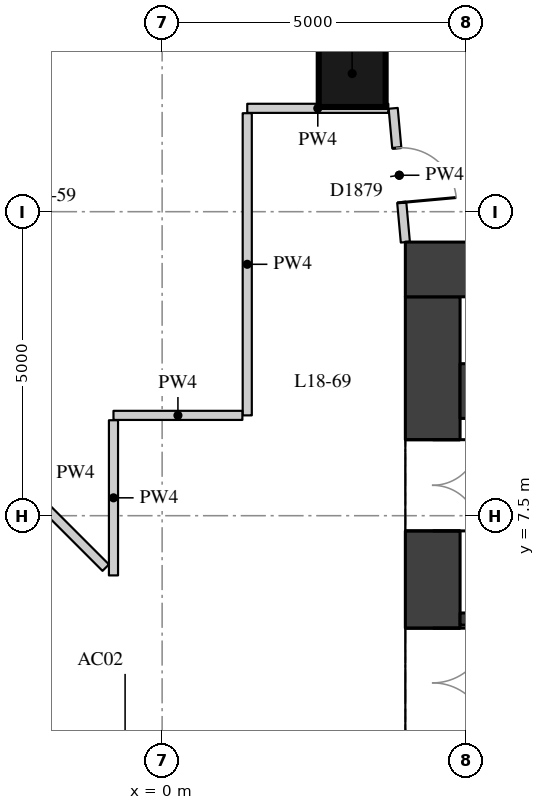
"""IFC4 building model, lengths in metres.
Left out: names, types, materials, properties, quantities, classifications, styles, units other than length and angle.
Written with IfcOpenShell. Run it as: python <this file> out.ifc"""

import sys

from ifc_helpers import new_model, si_unit, direction, frame, frame_2d, origin, origin_2d, place, context, subcontext, project, spatial, rectangle, extrude, element, fill, save


model = new_model("IFC4")
c1 = context("Model", 3, precision=1e-05, world=origin(), true_north=direction((0.0, 1.0)))
c2 = subcontext(c1, "Body", "Model", "MODEL_VIEW")
j1 = project(units=[si_unit("LENGTHUNIT", "METRE"), si_unit("PLANEANGLEUNIT", "RADIAN")], contexts=[c1])
p1 = place(None, origin())
s1 = spatial("IfcSite", under=j1, at=p1, CompositionType="ELEMENT")
p2 = place(p1, origin())
s2 = spatial("IfcBuilding", under=s1, at=p2, CompositionType="ELEMENT")
p3 = place(p2, frame((0.0, 0.0, 67.9)))
s3 = spatial("IfcBuildingStorey", under=s2, at=p3, CompositionType="ELEMENT", Elevation=67.9)
p4 = place(p3, frame((3.126, 14.772, 0.0), z_axis=(0.0, 0.0, 1.0), x_axis=(1.0, 0.0, 0.0)))
e1 = element("IfcColumn", 1, at=p4, inside=s3, PredefinedType="COLUMN", context=c2, shape_type="SweptSolid", body=[
    extrude(rectangle(XDim=1.1, YDim=1.1, at=origin_2d()), origin(), (0.0, 0.0, 1.0), 3.3),
])
p5 = place(p3, frame((4.45, -11.1, 0.0), z_axis=(0.0, 0.0, 1.0), x_axis=(0.0, 1.0, 0.0)))
e2 = element("IfcWall", 2, at=p5, inside=s3, PredefinedType="SHEAR", context=c2, shape_type="SweptSolid", body=[
    extrude(rectangle(XDim=22.2, YDim=0.9, at=frame_2d((11.1, 0.0))), origin(), (0.0, 0.0, 1.0), 3.02),
])
p6 = place(p5, frame((2.35, 0.0, 0.0)))
e3 = element("IfcOpeningElement", 3, at=p6, cuts=e2, PredefinedType="OPENING", context=c2, shape_type="SweptSolid", body=[
    extrude(rectangle(XDim=1.5, YDim=2.1, at=frame_2d((0.75, 1.05))), frame((0.0, 0.46, 0.0), z_axis=(0.0, -1.0, 0.0), x_axis=(1.0, 0.0, 0.0)), (0.0, 0.0, 1.0), 0.92),
])
p7 = place(p5, frame((5.45, 0.0, 0.0)))
e4 = element("IfcOpeningElement", 4, at=p7, cuts=e2, PredefinedType="OPENING", context=c2, shape_type="SweptSolid", body=[
    extrude(rectangle(XDim=1.8, YDim=2.1, at=frame_2d((0.9, 1.05))), frame((0.0, 0.46, 0.0), z_axis=(0.0, -1.0, 0.0), x_axis=(1.0, 0.0, 0.0)), (0.0, 0.0, 1.0), 0.92),
])
p8 = place(p5, frame((7.95, 0.0, 0.0)))
e5 = element("IfcOpeningElement", 5, at=p8, cuts=e2, PredefinedType="OPENING", context=c2, shape_type="SweptSolid", body=[
    extrude(rectangle(XDim=1.1, YDim=2.1, at=frame_2d((0.55, 1.05))), frame((0.0, 0.46, 0.0), z_axis=(0.0, -1.0, 0.0), x_axis=(1.0, 0.0, 0.0)), (0.0, 0.0, 1.0), 0.92),
])
p9 = place(p5, frame((10.6, 0.0, 0.0)))
e6 = element("IfcOpeningElement", 6, at=p9, cuts=e2, PredefinedType="OPENING", context=c2, shape_type="SweptSolid", body=[
    extrude(rectangle(XDim=1.0, YDim=2.1, at=frame_2d((0.5, 1.05))), frame((0.0, 0.46, 0.0), z_axis=(0.0, -1.0, 0.0), x_axis=(1.0, 0.0, 0.0)), (0.0, 0.0, 1.0), 0.92),
])
p10 = place(p5, frame((13.15, 0.0, 0.0)))
e7 = element("IfcOpeningElement", 7, at=p10, cuts=e2, PredefinedType="OPENING", context=c2, shape_type="SweptSolid", body=[
    extrude(rectangle(XDim=1.1, YDim=2.1, at=frame_2d((0.55, 1.05))), frame((0.0, 0.46, 0.0), z_axis=(0.0, -1.0, 0.0), x_axis=(1.0, 0.0, 0.0)), (0.0, 0.0, 1.0), 0.92),
])
p11 = place(p5, frame((14.95, 0.0, 0.0)))
e8 = element("IfcOpeningElement", 8, at=p11, cuts=e2, PredefinedType="OPENING", context=c2, shape_type="SweptSolid", body=[
    extrude(rectangle(XDim=1.8, YDim=2.1, at=frame_2d((0.9, 1.05))), frame((0.0, 0.46, 0.0), z_axis=(0.0, -1.0, 0.0), x_axis=(1.0, 0.0, 0.0)), (0.0, 0.0, 1.0), 0.92),
])
p12 = place(p5, frame((18.35, 0.0, 0.0)))
e9 = element("IfcOpeningElement", 9, at=p12, cuts=e2, PredefinedType="OPENING", context=c2, shape_type="SweptSolid", body=[
    extrude(rectangle(XDim=1.5, YDim=2.1, at=frame_2d((0.75, 1.05))), frame((0.0, 0.46, 0.0), z_axis=(0.0, -1.0, 0.0), x_axis=(1.0, 0.0, 0.0)), (0.0, 0.0, 1.0), 0.92),
])
p13 = place(p3, frame((4.0, 11.55, 0.0), z_axis=(0.0, 0.0, 1.0), x_axis=(1.0, 0.0, 0.0)))
e10 = element("IfcWall", 10, at=p13, inside=s3, PredefinedType="SHEAR", context=c2, shape_type="SweptSolid", body=[
    extrude(rectangle(XDim=15.2, YDim=0.9, at=frame_2d((7.6, 0.0))), origin(), (0.0, 0.0, 1.0), 3.02),
])
p14 = place(p3, frame((4.9, 9.55, 0.0), z_axis=(0.0, 0.0, 1.0), x_axis=(1.0, 0.0, 0.0)))
e11 = element("IfcWall", 11, at=p14, inside=s3, PredefinedType="SHEAR", context=c2, shape_type="SweptSolid", body=[
    extrude(rectangle(XDim=10.2, YDim=0.9, at=frame_2d((5.1, 0.0))), origin(), (0.0, 0.0, 1.0), 3.02),
])
p15 = place(p3, frame((4.9, 5.8, 0.0), z_axis=(0.0, 0.0, 1.0), x_axis=(1.0, 0.0, 0.0)))
e12 = element("IfcWall", 12, at=p15, inside=s3, PredefinedType="SHEAR", context=c2, shape_type="SweptSolid", body=[
    extrude(rectangle(XDim=10.2, YDim=0.2, at=frame_2d((5.1, 0.0))), origin(), (0.0, 0.0, 1.0), 3.02),
])
p16 = place(p15, frame((6.75, 0.0, 0.0)))
e13 = element("IfcOpeningElement", 13, at=p16, cuts=e12, PredefinedType="OPENING", context=c2, shape_type="SweptSolid", body=[
    extrude(rectangle(XDim=1.1, YDim=2.1, at=frame_2d((0.55, 1.05))), frame((0.0, 0.11, 0.0), z_axis=(0.0, -1.0, 0.0), x_axis=(1.0, 0.0, 0.0)), (0.0, 0.0, 1.0), 0.22),
])
p17 = place(p15, frame((8.75, 0.0, 0.0)))
e14 = element("IfcOpeningElement", 14, at=p17, cuts=e12, PredefinedType="OPENING", context=c2, shape_type="SweptSolid", body=[
    extrude(rectangle(XDim=1.1, YDim=2.1, at=frame_2d((0.55, 1.05))), frame((0.0, 0.11, 0.0), z_axis=(0.0, -1.0, 0.0), x_axis=(1.0, 0.0, 0.0)), (0.0, 0.0, 1.0), 0.22),
])
p18 = place(p3, frame((4.0, 11.999, 0.0), z_axis=(0.0, 0.0, 1.0), x_axis=(-0.090475982725, 0.995898637689, 0.0)))
e15 = element("IfcWall", 15, at=p18, inside=s3, PredefinedType="PARTITIONING", context=c2, shape_type="SweptSolid", body=[
    extrude(rectangle(XDim=2.21, YDim=0.15, at=frame_2d((1.105, 0.0))), origin(), (0.0, 0.0, 1.0), 3.02),
])
p19 = place(p18, frame((0.655, 0.0, 0.0)))
e16 = element("IfcOpeningElement", 16, at=p19, cuts=e15, PredefinedType="OPENING", context=c2, shape_type="SweptSolid", body=[
    extrude(rectangle(XDim=0.9, YDim=2.1, at=frame_2d((0.45, 1.05))), frame((0.0, 0.085, 0.0), z_axis=(0.0, -1.0, 0.0), x_axis=(1.0, 0.0, 0.0)), (0.0, 0.0, 1.0), 0.17),
])
p20 = place(p3, frame((3.72, 14.2, 0.0), z_axis=(0.0, 0.0, 1.0), x_axis=(-1.0, 0.0, 0.0)))
e17 = element("IfcWall", 17, at=p20, inside=s3, PredefinedType="PARTITIONING", context=c2, shape_type="SweptSolid", body=[
    extrude(rectangle(XDim=2.32, YDim=0.15, at=frame_2d((1.16, 0.0))), origin(), (0.0, 0.0, 1.0), 3.02),
])
p21 = place(p3, frame((1.4, 14.12, 0.0), z_axis=(0.0, 0.0, 1.0), x_axis=(0.0, -1.0, 0.0)))
e18 = element("IfcWall", 18, at=p21, inside=s3, PredefinedType="PARTITIONING", context=c2, shape_type="SweptSolid", body=[
    extrude(rectangle(XDim=4.97, YDim=0.15, at=frame_2d((2.485, 0.0))), origin(), (0.0, 0.0, 1.0), 3.02),
])
p22 = place(p3, frame((1.32, 9.15, 0.0), z_axis=(0.0, 0.0, 1.0), x_axis=(-1.0, 0.0, 0.0)))
e19 = element("IfcWall", 19, at=p22, inside=s3, PredefinedType="PARTITIONING", context=c2, shape_type="SweptSolid", body=[
    extrude(rectangle(XDim=2.12, YDim=0.15, at=frame_2d((1.06, 0.0))), origin(), (0.0, 0.0, 1.0), 3.02),
])
p23 = place(p3, frame((-0.8, 9.07, 0.0), z_axis=(0.0, 0.0, 1.0), x_axis=(0.0, -1.0, 0.0)))
e20 = element("IfcWall", 20, at=p23, inside=s3, PredefinedType="PARTITIONING", context=c2, shape_type="SweptSolid", body=[
    extrude(rectangle(XDim=2.552, YDim=0.15, at=frame_2d((1.276, 0.0))), origin(), (0.0, 0.0, 1.0), 3.02),
])
p24 = place(p3, frame((-0.927, 6.645, 0.0), z_axis=(0.0, 0.0, 1.0), x_axis=(-0.707106781187, 0.707106781187, 0.0)))
e21 = element("IfcWall", 21, at=p24, inside=s3, PredefinedType="PARTITIONING", context=c2, shape_type="SweptSolid", body=[
    extrude(rectangle(XDim=2.901, YDim=0.15, at=frame_2d((1.451, 0.0))), origin(), (0.0, 0.0, 1.0), 3.02),
])
p25 = place(p3, frame((-7.022, 14.875, 0.0), z_axis=(0.0, 0.0, 1.0), x_axis=(0.972565872543, 0.232627650043, 0.0)))
e22 = element("IfcWall", 22, at=p25, inside=s3, PredefinedType="PARTITIONING", context=c2, shape_type="SweptSolid", body=[
    extrude(rectangle(XDim=7.286, YDim=0.15, at=frame_2d((3.643, 0.0))), origin(), (0.0, 0.0, 1.0), 3.02),
])
p26 = place(p11, origin())
e23 = element("IfcDoor", 23, at=p26, inside=s3, OperationType="DOUBLE_DOOR_SINGLE_SWING", PredefinedType="DOOR", context=c2, shape_type="SweptSolid", body=[
    extrude(rectangle(XDim=1.8, YDim=2.1, at=frame_2d((0.9, 1.05))), frame((0.0, 0.025, 0.0), z_axis=(0.0, -1.0, 0.0), x_axis=(1.0, 0.0, 0.0)), (0.0, 0.0, 1.0), 0.05),
])
fill(e8, e23)
p27 = place(p12, origin())
e24 = element("IfcDoor", 24, at=p27, inside=s3, OperationType="DOUBLE_DOOR_SINGLE_SWING", PredefinedType="DOOR", context=c2, shape_type="SweptSolid", body=[
    extrude(rectangle(XDim=1.5, YDim=2.1, at=frame_2d((0.75, 1.05))), frame((0.0, 0.025, 0.0), z_axis=(0.0, -1.0, 0.0), x_axis=(1.0, 0.0, 0.0)), (0.0, 0.0, 1.0), 0.05),
])
fill(e9, e24)
p28 = place(p19, origin())
e25 = element("IfcDoor", 25, at=p28, inside=s3, OperationType="SINGLE_SWING_RIGHT", PredefinedType="DOOR", context=c2, shape_type="SweptSolid", body=[
    extrude(rectangle(XDim=0.9, YDim=2.1, at=frame_2d((0.45, 1.05))), frame((0.0, 0.025, 0.0), z_axis=(0.0, -1.0, 0.0), x_axis=(1.0, 0.0, 0.0)), (0.0, 0.0, 1.0), 0.05),
])
fill(e16, e25)
save(model, sys.argv[1])
